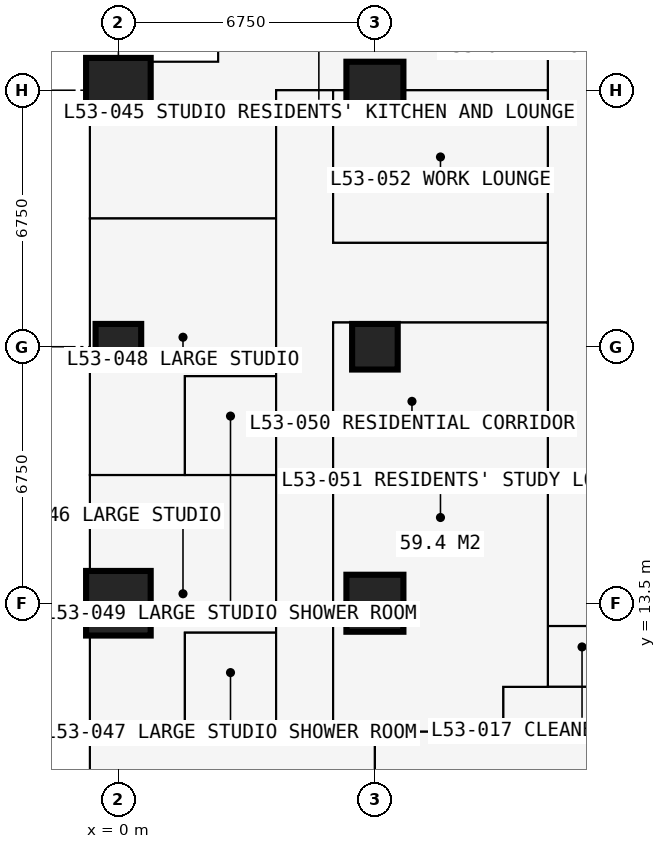
"""IFC4 building model, lengths in metres.
Left out: names, types, materials, properties, quantities, classifications, styles, units other than length and angle.
Written with IfcOpenShell. Run it as: python <this file> out.ifc"""

import sys

from ifc_helpers import new_model, si_unit, direction, frame, frame_2d, origin, origin_2d, place, context, subcontext, project, spatial, rectangle, extrude, element, fill, save


model = new_model("IFC4")
c1 = context("Model", 3, precision=1e-05, world=origin(), true_north=direction((0.0, 1.0)))
c2 = subcontext(c1, "Body", "Model", "MODEL_VIEW")
j1 = project(units=[si_unit("LENGTHUNIT", "METRE"), si_unit("PLANEANGLEUNIT", "RADIAN")], contexts=[c1])
p1 = place(None, origin())
s1 = spatial("IfcSite", under=j1, at=p1, CompositionType="ELEMENT")
p2 = place(p1, origin())
s2 = spatial("IfcBuilding", under=s1, at=p2, CompositionType="ELEMENT")
p3 = place(p2, frame((0.0, 0.0, 196.2)))
s3 = spatial("IfcBuildingStorey", under=s2, at=p3, CompositionType="ELEMENT", Elevation=196.2)
p4 = place(p3, frame((0.0, 13.5, 0.0), z_axis=(0.0, 0.0, 1.0), x_axis=(1.0, 0.0, 0.0)))
e1 = element("IfcColumn", 1, at=p4, inside=s3, PredefinedType="COLUMN", context=c2, shape_type="SweptSolid", body=[
    extrude(rectangle(XDim=1.7, YDim=1.7, at=origin_2d()), origin(), (0.0, 0.0, 1.0), 3.6),
])
p5 = place(p3, frame((0.0, 20.25, 0.0), z_axis=(0.0, 0.0, 1.0), x_axis=(1.0, 0.0, 0.0)))
e2 = element("IfcColumn", 2, at=p5, inside=s3, PredefinedType="COLUMN", context=c2, shape_type="SweptSolid", body=[
    extrude(rectangle(XDim=1.2, YDim=1.2, at=origin_2d()), origin(), (0.0, 0.0, 1.0), 3.6),
])
p6 = place(p3, frame((0.0, 27.0, 0.0), z_axis=(0.0, 0.0, 1.0), x_axis=(1.0, 0.0, 0.0)))
e3 = element("IfcColumn", 3, at=p6, inside=s3, PredefinedType="COLUMN", context=c2, shape_type="SweptSolid", body=[
    extrude(rectangle(XDim=1.7, YDim=1.7, at=origin_2d()), origin(), (0.0, 0.0, 1.0), 3.6),
])
p7 = place(p3, frame((6.75, 13.5, 0.0), z_axis=(0.0, 0.0, 1.0), x_axis=(1.0, 0.0, 0.0)))
e4 = element("IfcColumn", 4, at=p7, inside=s3, PredefinedType="COLUMN", context=c2, shape_type="SweptSolid", body=[
    extrude(rectangle(XDim=1.5, YDim=1.5, at=origin_2d()), origin(), (0.0, 0.0, 1.0), 3.6),
])
p8 = place(p3, frame((6.75, 20.25, 0.0), z_axis=(0.0, 0.0, 1.0), x_axis=(1.0, 0.0, 0.0)))
e5 = element("IfcColumn", 5, at=p8, inside=s3, PredefinedType="COLUMN", context=c2, shape_type="SweptSolid", body=[
    extrude(rectangle(XDim=1.2, YDim=1.2, at=origin_2d()), origin(), (0.0, 0.0, 1.0), 3.6),
])
p9 = place(p3, frame((6.75, 27.0, 0.0), z_axis=(0.0, 0.0, 1.0), x_axis=(1.0, 0.0, 0.0)))
e6 = element("IfcColumn", 6, at=p9, inside=s3, PredefinedType="COLUMN", context=c2, shape_type="SweptSolid", body=[
    extrude(rectangle(XDim=1.5, YDim=1.5, at=origin_2d()), origin(), (0.0, 0.0, 1.0), 3.6),
])
p10 = place(p3, frame((2.625, 31.125, 0.0), z_axis=(0.0, 0.0, 1.0), x_axis=(0.0, -1.0, 0.0)))
e7 = element("IfcWall", 7, at=p10, inside=s3, PredefinedType="SOLIDWALL", context=c2, shape_type="SweptSolid", body=[
    extrude(rectangle(XDim=3.375, YDim=0.3, at=frame_2d((1.688, 0.0))), origin(), (0.0, 0.0, 1.0), 3.3),
])
p11 = place(p10, frame((0.788, 0.0, 0.6)))
e8 = element("IfcOpeningElement", 8, at=p11, cuts=e7, PredefinedType="OPENING", context=c2, shape_type="SweptSolid", body=[
    extrude(rectangle(XDim=1.8, YDim=2.1, at=frame_2d((0.9, 1.05))), frame((0.0, 0.16, 0.0), z_axis=(0.0, -1.0, 0.0), x_axis=(1.0, 0.0, 0.0)), (0.0, 0.0, 1.0), 0.32),
])
p12 = place(p3, frame((2.625, 27.75, 0.0), z_axis=(0.0, 0.0, 1.0), x_axis=(-1.0, 0.0, 0.0)))
e9 = element("IfcWall", 9, at=p12, inside=s3, PredefinedType="SOLIDWALL", context=c2, shape_type="SweptSolid", body=[
    extrude(rectangle(XDim=3.375, YDim=0.3, at=frame_2d((1.688, 0.0))), origin(), (0.0, 0.0, 1.0), 3.3),
])
p13 = place(p12, frame((0.218, 0.0, 0.9)))
e10 = element("IfcOpeningElement", 10, at=p13, cuts=e9, PredefinedType="OPENING", context=c2, shape_type="SweptSolid", body=[
    extrude(rectangle(XDim=1.5, YDim=1.8, at=frame_2d((0.75, 0.9))), frame((0.0, 0.16, 0.0), z_axis=(0.0, -1.0, 0.0), x_axis=(1.0, 0.0, 0.0)), (0.0, 0.0, 1.0), 0.32),
])
p14 = place(p3, frame((-0.734, 10.125, 0.0), z_axis=(0.0, 0.0, 1.0), x_axis=(1.0, 0.0, 0.0)))
e11 = element("IfcWall", 11, at=p14, inside=s3, PredefinedType="PARTITIONING", context=c2, shape_type="SweptSolid", body=[
    extrude(rectangle(XDim=10.859, YDim=0.15, at=frame_2d((5.429, 0.0))), origin(), (0.0, 0.0, 1.0), 3.3),
])
p15 = place(p3, frame((-0.734, 16.875, 0.0), z_axis=(0.0, 0.0, 1.0), x_axis=(1.0, 0.0, 0.0)))
e12 = element("IfcWall", 12, at=p15, inside=s3, PredefinedType="PARTITIONING", context=c2, shape_type="SweptSolid", body=[
    extrude(rectangle(XDim=4.884, YDim=0.175, at=frame_2d((2.442, 0.0))), origin(), (0.0, 0.0, 1.0), 3.3),
])
p16 = place(p15, frame((3.234, 0.0, 0.0)))
e13 = element("IfcOpeningElement", 13, at=p16, cuts=e12, PredefinedType="OPENING", context=c2, shape_type="SweptSolid", body=[
    extrude(rectangle(XDim=0.9, YDim=2.2, at=frame_2d((0.45, 1.1))), frame((0.0, 0.097, 0.0), z_axis=(0.0, -1.0, 0.0), x_axis=(1.0, 0.0, 0.0)), (0.0, 0.0, 1.0), 0.195),
])
p17 = place(p3, frame((-0.734, 23.625, 0.0), z_axis=(0.0, 0.0, 1.0), x_axis=(1.0, 0.0, 0.0)))
e14 = element("IfcWall", 14, at=p17, inside=s3, PredefinedType="PARTITIONING", context=c2, shape_type="SweptSolid", body=[
    extrude(rectangle(XDim=4.884, YDim=0.15, at=frame_2d((2.442, 0.0))), origin(), (0.0, 0.0, 1.0), 3.3),
])
p18 = place(p3, frame((1.75, 10.125, 0.0), z_axis=(0.0, 0.0, 1.0), x_axis=(0.0, 1.0, 0.0)))
e15 = element("IfcWall", 15, at=p18, inside=s3, PredefinedType="PARTITIONING", context=c2, shape_type="SweptSolid", body=[
    extrude(rectangle(XDim=2.6, YDim=0.1, at=frame_2d((1.3, 0.0))), origin(), (0.0, 0.0, 1.0), 3.3),
])
p19 = place(p18, frame((0.85, 0.0, 0.0)))
e16 = element("IfcOpeningElement", 16, at=p19, cuts=e15, PredefinedType="OPENING", context=c2, shape_type="SweptSolid", body=[
    extrude(rectangle(XDim=0.9, YDim=2.2, at=frame_2d((0.45, 1.1))), frame((0.0, 0.06, 0.0), z_axis=(0.0, -1.0, 0.0), x_axis=(1.0, 0.0, 0.0)), (0.0, 0.0, 1.0), 0.12),
])
p20 = place(p3, frame((1.75, 12.725, 0.0), z_axis=(0.0, 0.0, 1.0), x_axis=(1.0, 0.0, 0.0)))
e17 = element("IfcWall", 17, at=p20, inside=s3, PredefinedType="PARTITIONING", context=c2, shape_type="SweptSolid", body=[
    extrude(rectangle(XDim=2.4, YDim=0.1, at=frame_2d((1.2, 0.0))), origin(), (0.0, 0.0, 1.0), 3.3),
])
p21 = place(p3, frame((1.75, 16.875, 0.0), z_axis=(0.0, 0.0, 1.0), x_axis=(0.0, 1.0, 0.0)))
e18 = element("IfcWall", 18, at=p21, inside=s3, PredefinedType="PARTITIONING", context=c2, shape_type="SweptSolid", body=[
    extrude(rectangle(XDim=2.6, YDim=0.1, at=frame_2d((1.3, 0.0))), origin(), (0.0, 0.0, 1.0), 3.3),
])
p22 = place(p3, frame((1.75, 19.475, 0.0), z_axis=(0.0, 0.0, 1.0), x_axis=(1.0, 0.0, 0.0)))
e19 = element("IfcWall", 19, at=p22, inside=s3, PredefinedType="PARTITIONING", context=c2, shape_type="SweptSolid", body=[
    extrude(rectangle(XDim=2.4, YDim=0.1, at=frame_2d((1.2, 0.0))), origin(), (0.0, 0.0, 1.0), 3.3),
])
p23 = place(p3, frame((4.15, 10.125, 0.0), z_axis=(0.0, 0.0, 1.0), x_axis=(0.0, 1.0, 0.0)))
e20 = element("IfcWall", 20, at=p23, inside=s3, PredefinedType="PARTITIONING", context=c2, shape_type="SweptSolid", body=[
    extrude(rectangle(XDim=16.875, YDim=0.1, at=frame_2d((8.438, 0.0))), origin(), (0.0, 0.0, 1.0), 3.3),
])
p24 = place(p23, frame((4.2, 0.0, 0.0)))
e21 = element("IfcOpeningElement", 21, at=p24, cuts=e20, PredefinedType="OPENING", context=c2, shape_type="SweptSolid", body=[
    extrude(rectangle(XDim=0.95, YDim=2.2, at=frame_2d((0.475, 1.1))), frame((0.0, 0.06, 0.0), z_axis=(0.0, -1.0, 0.0), x_axis=(1.0, 0.0, 0.0)), (0.0, 0.0, 1.0), 0.12),
])
p25 = place(p23, frame((10.95, 0.0, 0.0)))
e22 = element("IfcOpeningElement", 22, at=p25, cuts=e20, PredefinedType="OPENING", context=c2, shape_type="SweptSolid", body=[
    extrude(rectangle(XDim=0.95, YDim=2.2, at=frame_2d((0.475, 1.1))), frame((0.0, 0.06, 0.0), z_axis=(0.0, -1.0, 0.0), x_axis=(1.0, 0.0, 0.0)), (0.0, 0.0, 1.0), 0.12),
])
p26 = place(p3, frame((4.15, 27.0, 0.0), z_axis=(0.0, 0.0, 1.0), x_axis=(1.0, 0.0, 0.0)))
e23 = element("IfcWall", 23, at=p26, inside=s3, PredefinedType="PARTITIONING", context=c2, shape_type="SweptSolid", body=[
    extrude(rectangle(XDim=7.15, YDim=0.15, at=frame_2d((3.575, 0.0))), origin(), (0.0, 0.0, 1.0), 2.802),
])
p27 = place(p3, frame((5.65, 10.125, 0.0), z_axis=(0.0, 0.0, 1.0), x_axis=(0.0, 1.0, 0.0)))
e24 = element("IfcWall", 24, at=p27, inside=s3, PredefinedType="PARTITIONING", context=c2, shape_type="SweptSolid", body=[
    extrude(rectangle(XDim=10.762, YDim=0.15, at=frame_2d((5.381, 0.0))), origin(), (0.0, 0.0, 1.0), 3.3),
])
p28 = place(p27, frame((4.9, 0.0, 0.0)))
e25 = element("IfcOpeningElement", 25, at=p28, cuts=e24, PredefinedType="OPENING", context=c2, shape_type="SweptSolid", body=[
    extrude(rectangle(XDim=0.95, YDim=2.2, at=frame_2d((0.475, 1.1))), frame((0.0, 0.085, 0.0), z_axis=(0.0, -1.0, 0.0), x_axis=(1.0, 0.0, 0.0)), (0.0, 0.0, 1.0), 0.17),
])
p29 = place(p3, frame((5.65, 20.887, 0.0), z_axis=(0.0, 0.0, 1.0), x_axis=(1.0, 0.0, 0.0)))
e26 = element("IfcWall", 26, at=p29, inside=s3, PredefinedType="PARTITIONING", context=c2, shape_type="SweptSolid", body=[
    extrude(rectangle(XDim=5.65, YDim=0.15, at=frame_2d((2.825, 0.0))), origin(), (0.0, 0.0, 1.0), 3.3),
])
p30 = place(p3, frame((5.65, 22.988, 0.0), z_axis=(0.0, 0.0, 1.0), x_axis=(0.0, 1.0, 0.0)))
e27 = element("IfcWall", 27, at=p30, inside=s3, PredefinedType="PARTITIONING", context=c2, shape_type="SweptSolid", body=[
    extrude(rectangle(XDim=4.012, YDim=0.15, at=frame_2d((2.006, 0.0))), origin(), (0.0, 0.0, 1.0), 3.3),
])
p31 = place(p3, frame((5.65, 22.988, 0.0), z_axis=(0.0, 0.0, 1.0), x_axis=(1.0, 0.0, 0.0)))
e28 = element("IfcWall", 28, at=p31, inside=s3, PredefinedType="PARTITIONING", context=c2, shape_type="SweptSolid", body=[
    extrude(rectangle(XDim=5.65, YDim=0.15, at=frame_2d((2.825, 0.0))), origin(), (0.0, 0.0, 1.0), 3.3),
])
p32 = place(p31, frame((2.35, 0.0, 0.0)))
e29 = element("IfcOpeningElement", 29, at=p32, cuts=e28, PredefinedType="OPENING", context=c2, shape_type="SweptSolid", body=[
    extrude(rectangle(XDim=0.95, YDim=2.2, at=frame_2d((0.475, 1.1))), frame((0.0, 0.085, 0.0), z_axis=(0.0, -1.0, 0.0), x_axis=(1.0, 0.0, 0.0)), (0.0, 0.0, 1.0), 0.17),
])
p33 = place(p3, frame((6.75, 4.15, 0.0), z_axis=(0.0, 0.0, 1.0), x_axis=(0.0, 1.0, 0.0)))
e30 = element("IfcWall", 30, at=p33, inside=s3, PredefinedType="PARTITIONING", context=c2, shape_type="SweptSolid", body=[
    extrude(rectangle(XDim=5.975, YDim=0.15, at=frame_2d((2.988, 0.0))), origin(), (0.0, 0.0, 1.0), 2.802),
])
p34 = place(p3, frame((10.125, 10.125, 0.0), z_axis=(0.0, 0.0, 1.0), x_axis=(0.0, 1.0, 0.0)))
e31 = element("IfcWall", 31, at=p34, inside=s3, PredefinedType="PARTITIONING", context=c2, shape_type="SweptSolid", body=[
    extrude(rectangle(XDim=1.175, YDim=0.15, at=frame_2d((0.587, 0.0))), origin(), (0.0, 0.0, 1.0), 3.3),
])
p35 = place(p3, frame((10.125, 11.3, 0.0), z_axis=(0.0, 0.0, 1.0), x_axis=(1.0, 0.0, 0.0)))
e32 = element("IfcWall", 32, at=p35, inside=s3, PredefinedType="PARTITIONING", context=c2, shape_type="SweptSolid", body=[
    extrude(rectangle(XDim=20.475, YDim=0.15, at=frame_2d((10.238, 0.0))), origin(), (0.0, 0.0, 1.0), 3.3),
])
p36 = place(p35, frame((8.425, 0.0, 0.0)))
e33 = element("IfcOpeningElement", 33, at=p36, cuts=e32, PredefinedType="OPENING", context=c2, shape_type="SweptSolid", body=[
    extrude(rectangle(XDim=1.0, YDim=2.2, at=frame_2d((0.5, 1.1))), frame((0.0, 0.085, 0.0), z_axis=(0.0, -1.0, 0.0), x_axis=(1.0, 0.0, 0.0)), (0.0, 0.0, 1.0), 0.17),
])
p37 = place(p35, frame((10.975, 0.0, 0.0)))
e34 = element("IfcOpeningElement", 34, at=p37, cuts=e32, PredefinedType="OPENING", context=c2, shape_type="SweptSolid", body=[
    extrude(rectangle(XDim=1.0, YDim=2.2, at=frame_2d((0.5, 1.1))), frame((0.0, 0.085, 0.0), z_axis=(0.0, -1.0, 0.0), x_axis=(1.0, 0.0, 0.0)), (0.0, 0.0, 1.0), 0.17),
])
p38 = place(p35, frame((4.875, 0.0, 0.0)))
e35 = element("IfcOpeningElement", 35, at=p38, cuts=e32, PredefinedType="OPENING", context=c2, shape_type="SweptSolid", body=[
    extrude(rectangle(XDim=0.95, YDim=2.2, at=frame_2d((0.475, 1.1))), frame((0.0, 0.085, 0.0), z_axis=(0.0, -1.0, 0.0), x_axis=(1.0, 0.0, 0.0)), (0.0, 0.0, 1.0), 0.17),
])
p39 = place(p3, frame((11.3, 11.3, 0.0), z_axis=(0.0, 0.0, 1.0), x_axis=(0.0, 1.0, 0.0)))
e36 = element("IfcWall", 36, at=p39, inside=s3, PredefinedType="PARTITIONING", context=c2, shape_type="SweptSolid", body=[
    extrude(rectangle(XDim=19.3, YDim=0.15, at=frame_2d((9.65, 0.0))), origin(), (0.0, 0.0, 1.0), 3.3),
])
p40 = place(p39, frame((18.1, 0.0, 0.0)))
e37 = element("IfcOpeningElement", 37, at=p40, cuts=e36, PredefinedType="OPENING", context=c2, shape_type="SweptSolid", body=[
    extrude(rectangle(XDim=1.0, YDim=2.2, at=frame_2d((0.5, 1.1))), frame((0.0, 0.085, 0.0), z_axis=(0.0, -1.0, 0.0), x_axis=(1.0, 0.0, 0.0)), (0.0, 0.0, 1.0), 0.17),
])
p41 = place(p39, frame((10.137, 0.0, 0.0)))
e38 = element("IfcOpeningElement", 38, at=p41, cuts=e36, PredefinedType="OPENING", context=c2, shape_type="SweptSolid", body=[
    extrude(rectangle(XDim=1.0, YDim=2.2, at=frame_2d((0.5, 1.1))), frame((0.0, 0.085, 0.0), z_axis=(0.0, -1.0, 0.0), x_axis=(1.0, 0.0, 0.0)), (0.0, 0.0, 1.0), 0.17),
])
p42 = place(p3, frame((11.3, 12.9, 0.0), z_axis=(0.0, 0.0, 1.0), x_axis=(1.0, 0.0, 0.0)))
e39 = element("IfcWall", 39, at=p42, inside=s3, PredefinedType="PARTITIONING", context=c2, shape_type="SweptSolid", body=[
    extrude(rectangle(XDim=1.8, YDim=0.15, at=frame_2d((0.9, 0.0))), origin(), (0.0, 0.0, 1.0), 2.802),
])
p43 = place(p42, frame((0.4, 0.0, 0.0)))
e40 = element("IfcOpeningElement", 40, at=p43, cuts=e39, PredefinedType="OPENING", context=c2, shape_type="SweptSolid", body=[
    extrude(rectangle(XDim=0.95, YDim=2.2, at=frame_2d((0.475, 1.1))), frame((0.0, 0.085, 0.0), z_axis=(0.0, -1.0, 0.0), x_axis=(1.0, 0.0, 0.0)), (0.0, 0.0, 1.0), 0.17),
])
p44 = place(p13, origin())
e41 = element("IfcWindow", 41, at=p44, inside=s3, PartitioningType="SINGLE_PANEL", PredefinedType="WINDOW", context=c2, shape_type="SweptSolid", body=[
    extrude(rectangle(XDim=1.5, YDim=1.8, at=frame_2d((0.75, 0.9))), frame((0.0, 0.03, 0.0), z_axis=(0.0, -1.0, 0.0), x_axis=(1.0, 0.0, 0.0)), (0.0, 0.0, 1.0), 0.06),
])
fill(e10, e41)
p45 = place(p43, origin())
e42 = element("IfcDoor", 42, at=p45, inside=s3, OperationType="SINGLE_SWING_LEFT", PredefinedType="DOOR", context=c2, shape_type="SweptSolid", body=[
    extrude(rectangle(XDim=0.95, YDim=2.2, at=frame_2d((0.475, 1.1))), frame((0.0, 0.025, 0.0), z_axis=(0.0, -1.0, 0.0), x_axis=(1.0, 0.0, 0.0)), (0.0, 0.0, 1.0), 0.05),
])
fill(e40, e42)
p46 = place(p24, origin())
e43 = element("IfcDoor", 43, at=p46, inside=s3, OperationType="SINGLE_SWING_LEFT", PredefinedType="DOOR", context=c2, shape_type="SweptSolid", body=[
    extrude(rectangle(XDim=0.95, YDim=2.2, at=frame_2d((0.475, 1.1))), frame((0.0, 0.025, 0.0), z_axis=(0.0, -1.0, 0.0), x_axis=(1.0, 0.0, 0.0)), (0.0, 0.0, 1.0), 0.05),
])
fill(e21, e43)
p47 = place(p19, origin())
e44 = element("IfcDoor", 44, at=p47, inside=s3, OperationType="SINGLE_SWING_RIGHT", PredefinedType="DOOR", context=c2, shape_type="SweptSolid", body=[
    extrude(rectangle(XDim=0.9, YDim=2.2, at=frame_2d((0.45, 1.1))), frame((0.0, 0.025, 0.0), z_axis=(0.0, -1.0, 0.0), x_axis=(1.0, 0.0, 0.0)), (0.0, 0.0, 1.0), 0.05),
])
fill(e16, e44)
p48 = place(p25, origin())
e45 = element("IfcDoor", 45, at=p48, inside=s3, OperationType="SINGLE_SWING_LEFT", PredefinedType="DOOR", context=c2, shape_type="SweptSolid", body=[
    extrude(rectangle(XDim=0.95, YDim=2.2, at=frame_2d((0.475, 1.1))), frame((0.0, 0.025, 0.0), z_axis=(0.0, -1.0, 0.0), x_axis=(1.0, 0.0, 0.0)), (0.0, 0.0, 1.0), 0.05),
])
fill(e22, e45)
p49 = place(p16, origin())
e46 = element("IfcDoor", 46, at=p49, inside=s3, OperationType="SINGLE_SWING_RIGHT", PredefinedType="DOOR", context=c2, shape_type="SweptSolid", body=[
    extrude(rectangle(XDim=0.9, YDim=2.2, at=frame_2d((0.45, 1.1))), frame((0.0, 0.025, 0.0), z_axis=(0.0, -1.0, 0.0), x_axis=(1.0, 0.0, 0.0)), (0.0, 0.0, 1.0), 0.05),
])
fill(e13, e46)
p50 = place(p41, origin())
e47 = element("IfcDoor", 47, at=p50, inside=s3, OperationType="SINGLE_SWING_LEFT", PredefinedType="DOOR", context=c2, shape_type="SweptSolid", body=[
    extrude(rectangle(XDim=1.0, YDim=2.2, at=frame_2d((0.5, 1.1))), frame((0.0, 0.025, 0.0), z_axis=(0.0, -1.0, 0.0), x_axis=(1.0, 0.0, 0.0)), (0.0, 0.0, 1.0), 0.05),
])
fill(e38, e47)
p51 = place(p28, origin())
e48 = element("IfcDoor", 48, at=p51, inside=s3, OperationType="SINGLE_SWING_LEFT", PredefinedType="DOOR", context=c2, shape_type="SweptSolid", body=[
    extrude(rectangle(XDim=0.95, YDim=2.2, at=frame_2d((0.475, 1.1))), frame((0.0, 0.025, 0.0), z_axis=(0.0, -1.0, 0.0), x_axis=(1.0, 0.0, 0.0)), (0.0, 0.0, 1.0), 0.05),
])
fill(e25, e48)
p52 = place(p32, origin())
e49 = element("IfcDoor", 49, at=p52, inside=s3, OperationType="SINGLE_SWING_LEFT", PredefinedType="DOOR", context=c2, shape_type="SweptSolid", body=[
    extrude(rectangle(XDim=0.95, YDim=2.2, at=frame_2d((0.475, 1.1))), frame((0.0, 0.025, 0.0), z_axis=(0.0, -1.0, 0.0), x_axis=(1.0, 0.0, 0.0)), (0.0, 0.0, 1.0), 0.05),
])
fill(e29, e49)
save(model, sys.argv[1])
